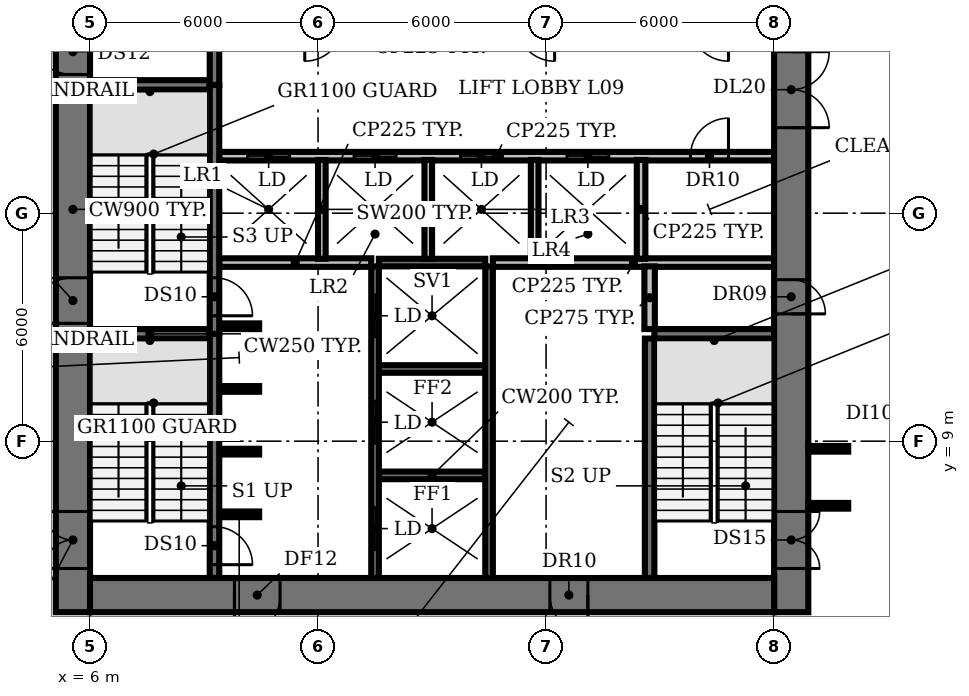
"""IFC4 building model, lengths in metres.
Left out: names, types, materials, properties, quantities, classifications, styles, units other than length and angle.
Written with IfcOpenShell. Run it as: python <this file> out.ifc"""

import sys

from ifc_helpers import new_model, si_unit, direction, frame, frame_2d, origin, place, context, subcontext, project, spatial, rectangle, extrude, element, fill, save


model = new_model("IFC4")
c1 = context("Model", 3, precision=1e-05, world=origin(), true_north=direction((0.0, 1.0)))
c2 = subcontext(c1, "Body", "Model", "MODEL_VIEW")
j1 = project(units=[si_unit("LENGTHUNIT", "METRE"), si_unit("PLANEANGLEUNIT", "RADIAN")], contexts=[c1])
p1 = place(None, origin())
s1 = spatial("IfcSite", under=j1, at=p1, CompositionType="ELEMENT")
p2 = place(p1, origin())
s2 = spatial("IfcBuilding", under=s1, at=p2, CompositionType="ELEMENT")
p3 = place(p2, frame((0.0, 0.0, 41.6)))
s3 = spatial("IfcBuildingStorey", under=s2, at=p3, CompositionType="ELEMENT", Elevation=41.6)
p4 = place(p3, frame((9.4, 7.075, 0.0), z_axis=(0.0, 0.0, 1.0), x_axis=(1.0, 0.0, 0.0)))
e1 = element("IfcWall", 1, at=p4, inside=s3, PredefinedType="SHEAR", context=c2, shape_type="SweptSolid", body=[
    extrude(rectangle(XDim=1.05, YDim=0.15, at=frame_2d((0.525, 0.0))), origin(), (0.0, 0.0, 1.0), 3.85),
])
p5 = place(p3, frame((13.6, 8.1, 0.0), z_axis=(0.0, 0.0, 1.0), x_axis=(1.0, 0.0, 0.0)))
e2 = element("IfcWall", 2, at=p5, inside=s3, PredefinedType="SHEAR", context=c2, shape_type="SweptSolid", body=[
    extrude(rectangle(XDim=2.8, YDim=0.2, at=frame_2d((1.4, 0.0))), origin(), (0.0, 0.0, 1.0), 3.85),
])
for number, where, z_axis, x_axis in (
    (3, (9.4, 8.725, 0.0), (0.0, 0.0, 1.0), (1.0, 0.0, 0.0)),
    (4, (9.4, 10.375, 0.0), (0.0, 0.0, 1.0), (1.0, 0.0, 0.0)),
):
    element("IfcWall", number, at=place(p3, frame(where, z_axis=z_axis, x_axis=x_axis)), inside=s3, PredefinedType="SHEAR", context=c2, shape_type="SweptSolid", body=[
        extrude(rectangle(XDim=1.05, YDim=0.15, at=frame_2d((0.525, 0.0))), origin(), (0.0, 0.0, 1.0), 3.85),
    ])
p6 = place(p3, frame((13.6, 10.9, 0.0), z_axis=(0.0, 0.0, 1.0), x_axis=(1.0, 0.0, 0.0)))
e5 = element("IfcWall", 5, at=p6, inside=s3, PredefinedType="SHEAR", context=c2, shape_type="SweptSolid", body=[
    extrude(rectangle(XDim=2.8, YDim=0.2, at=frame_2d((1.4, 0.0))), origin(), (0.0, 0.0, 1.0), 3.85),
])
for number, where, z_axis, x_axis in (
    (6, (6.0, 11.825, 0.0), (0.0, 0.0, 1.0), (1.0, 0.0, 0.0)),
    (7, (20.85, 11.825, 0.0), (0.0, 0.0, 1.0), (1.0, 0.0, 0.0)),
):
    element("IfcWall", number, at=place(p3, frame(where, z_axis=z_axis, x_axis=x_axis)), inside=s3, PredefinedType="SHEAR", context=c2, shape_type="SweptSolid", body=[
        extrude(rectangle(XDim=3.15, YDim=0.25, at=frame_2d((1.575, 0.0))), origin(), (0.0, 0.0, 1.0), 3.85),
    ])
p7 = place(p3, frame((9.4, 12.025, 0.0), z_axis=(0.0, 0.0, 1.0), x_axis=(1.0, 0.0, 0.0)))
e8 = element("IfcWall", 8, at=p7, inside=s3, PredefinedType="SHEAR", context=c2, shape_type="SweptSolid", body=[
    extrude(rectangle(XDim=1.05, YDim=0.15, at=frame_2d((0.525, 0.0))), origin(), (0.0, 0.0, 1.0), 3.85),
])
p8 = place(p3, frame((9.4, 13.7, 0.0), z_axis=(0.0, 0.0, 1.0), x_axis=(1.0, 0.0, 0.0)))
e9 = element("IfcWall", 9, at=p8, inside=s3, PredefinedType="PARTITIONING", context=c2, shape_type="SweptSolid", body=[
    extrude(rectangle(XDim=4.0, YDim=0.225, at=frame_2d((2.0, 0.0))), origin(), (0.0, 0.0, 1.0), 3.85),
])
p9 = place(p3, frame((13.6, 13.7, 0.0), z_axis=(0.0, 0.0, 1.0), x_axis=(1.0, 0.0, 0.0)))
e10 = element("IfcWall", 10, at=p9, inside=s3, PredefinedType="SHEAR", context=c2, shape_type="SweptSolid", body=[
    extrude(rectangle(XDim=2.8, YDim=0.2, at=frame_2d((1.4, 0.0))), origin(), (0.0, 0.0, 1.0), 3.85),
])
p10 = place(p3, frame((16.6, 13.7, 0.0), z_axis=(0.0, 0.0, 1.0), x_axis=(1.0, 0.0, 0.0)))
e11 = element("IfcWall", 11, at=p10, inside=s3, PredefinedType="PARTITIONING", context=c2, shape_type="SweptSolid", body=[
    extrude(rectangle(XDim=7.4, YDim=0.225, at=frame_2d((3.7, 0.0))), origin(), (0.0, 0.0, 1.0), 3.85),
])
p11 = place(p3, frame((9.4, 16.5, 0.0), z_axis=(0.0, 0.0, 1.0), x_axis=(1.0, 0.0, 0.0)))
e12 = element("IfcWall", 12, at=p11, inside=s3, PredefinedType="PARTITIONING", context=c2, shape_type="SweptSolid", body=[
    extrude(rectangle(XDim=14.6, YDim=0.225, at=frame_2d((7.3, 0.0))), origin(), (0.0, 0.0, 1.0), 3.85),
])
p12 = place(p11, frame((0.75, 0.0, 0.0)))
e13 = element("IfcOpeningElement", 13, at=p12, cuts=e12, PredefinedType="OPENING", context=c2, shape_type="SweptSolid", body=[
    extrude(rectangle(XDim=1.1, YDim=2.1, at=frame_2d((0.55, 1.05))), frame((0.0, 0.123, 0.0), z_axis=(0.0, -1.0, 0.0), x_axis=(1.0, 0.0, 0.0)), (0.0, 0.0, 1.0), 0.245),
])
p13 = place(p11, frame((3.55, 0.0, 0.0)))
e14 = element("IfcOpeningElement", 14, at=p13, cuts=e12, PredefinedType="OPENING", context=c2, shape_type="SweptSolid", body=[
    extrude(rectangle(XDim=1.1, YDim=2.1, at=frame_2d((0.55, 1.05))), frame((0.0, 0.123, 0.0), z_axis=(0.0, -1.0, 0.0), x_axis=(1.0, 0.0, 0.0)), (0.0, 0.0, 1.0), 0.245),
])
p14 = place(p11, frame((6.35, 0.0, 0.0)))
e15 = element("IfcOpeningElement", 15, at=p14, cuts=e12, PredefinedType="OPENING", context=c2, shape_type="SweptSolid", body=[
    extrude(rectangle(XDim=1.1, YDim=2.1, at=frame_2d((0.55, 1.05))), frame((0.0, 0.123, 0.0), z_axis=(0.0, -1.0, 0.0), x_axis=(1.0, 0.0, 0.0)), (0.0, 0.0, 1.0), 0.245),
])
p15 = place(p11, frame((9.15, 0.0, 0.0)))
e16 = element("IfcOpeningElement", 16, at=p15, cuts=e12, PredefinedType="OPENING", context=c2, shape_type="SweptSolid", body=[
    extrude(rectangle(XDim=1.1, YDim=2.1, at=frame_2d((0.55, 1.05))), frame((0.0, 0.123, 0.0), z_axis=(0.0, -1.0, 0.0), x_axis=(1.0, 0.0, 0.0)), (0.0, 0.0, 1.0), 0.245),
])
p16 = place(p11, frame((12.4, 0.0, 0.0)))
e17 = element("IfcOpeningElement", 17, at=p16, cuts=e12, PredefinedType="OPENING", context=c2, shape_type="SweptSolid", body=[
    extrude(rectangle(XDim=1.0, YDim=2.1, at=frame_2d((0.5, 1.05))), frame((0.0, 0.123, 0.0), z_axis=(0.0, -1.0, 0.0), x_axis=(1.0, 0.0, 0.0)), (0.0, 0.0, 1.0), 0.245),
])
p17 = place(p3, frame((6.0, 18.375, 0.0), z_axis=(0.0, 0.0, 1.0), x_axis=(1.0, 0.0, 0.0)))
e18 = element("IfcWall", 18, at=p17, inside=s3, PredefinedType="SHEAR", context=c2, shape_type="SweptSolid", body=[
    extrude(rectangle(XDim=3.15, YDim=0.25, at=frame_2d((1.575, 0.0))), origin(), (0.0, 0.0, 1.0), 3.85),
])
p18 = place(p3, frame((9.275, 11.825, 0.0), z_axis=(0.0, 0.0, 1.0), x_axis=(0.0, -1.0, 0.0)))
e19 = element("IfcWall", 19, at=p18, inside=s3, PredefinedType="SHEAR", context=c2, shape_type="SweptSolid", body=[
    extrude(rectangle(XDim=6.425, YDim=0.25, at=frame_2d((3.212, 0.0))), origin(), (0.0, 0.0, 1.0), 3.85),
])
p19 = place(p18, frame((5.075, 0.0, 0.0)))
e20 = element("IfcOpeningElement", 20, at=p19, cuts=e19, PredefinedType="OPENING", context=c2, shape_type="SweptSolid", body=[
    extrude(rectangle(XDim=1.0, YDim=2.1, at=frame_2d((0.5, 1.05))), frame((0.0, 0.135, 0.0), z_axis=(0.0, -1.0, 0.0), x_axis=(1.0, 0.0, 0.0)), (0.0, 0.0, 1.0), 0.27),
])
p20 = place(p3, frame((9.275, 18.375, 0.0), z_axis=(0.0, 0.0, 1.0), x_axis=(0.0, -1.0, 0.0)))
e21 = element("IfcWall", 21, at=p20, inside=s3, PredefinedType="SHEAR", context=c2, shape_type="SweptSolid", body=[
    extrude(rectangle(XDim=6.55, YDim=0.25, at=frame_2d((3.275, 0.0))), origin(), (0.0, 0.0, 1.0), 3.85),
])
p21 = place(p20, frame((5.075, 0.0, 0.0)))
e22 = element("IfcOpeningElement", 22, at=p21, cuts=e21, PredefinedType="OPENING", context=c2, shape_type="SweptSolid", body=[
    extrude(rectangle(XDim=1.0, YDim=2.1, at=frame_2d((0.5, 1.05))), frame((0.0, 0.135, 0.0), z_axis=(0.0, -1.0, 0.0), x_axis=(1.0, 0.0, 0.0)), (0.0, 0.0, 1.0), 0.27),
])
p22 = place(p3, frame((9.275, 18.375, 0.0), z_axis=(0.0, 0.0, 1.0), x_axis=(0.0, 1.0, 0.0)))
e23 = element("IfcWall", 23, at=p22, inside=s3, PredefinedType="SHEAR", context=c2, shape_type="SweptSolid", body=[
    extrude(rectangle(XDim=6.425, YDim=0.25, at=frame_2d((3.212, 0.0))), origin(), (0.0, 0.0, 1.0), 3.85),
])
p23 = place(p3, frame((12.1, 13.8, 0.0), z_axis=(0.0, 0.0, 1.0), x_axis=(0.0, 1.0, 0.0)))
e24 = element("IfcWall", 24, at=p23, inside=s3, PredefinedType="SOLIDWALL", context=c2, shape_type="SweptSolid", body=[
    extrude(rectangle(XDim=2.6, YDim=0.2, at=frame_2d((1.3, 0.0))), origin(), (0.0, 0.0, 1.0), 3.85),
])
p24 = place(p3, frame((13.5, 5.4, 0.0), z_axis=(0.0, 0.0, 1.0), x_axis=(0.0, 1.0, 0.0)))
e25 = element("IfcWall", 25, at=p24, inside=s3, PredefinedType="SHEAR", context=c2, shape_type="SweptSolid", body=[
    extrude(rectangle(XDim=8.2, YDim=0.2, at=frame_2d((4.1, 0.0))), origin(), (0.0, 0.0, 1.0), 3.85),
])
p25 = place(p24, frame((0.75, 0.0, 0.0)))
e26 = element("IfcOpeningElement", 26, at=p25, cuts=e25, PredefinedType="OPENING", context=c2, shape_type="SweptSolid", body=[
    extrude(rectangle(XDim=1.1, YDim=2.1, at=frame_2d((0.55, 1.05))), frame((0.0, 0.11, 0.0), z_axis=(0.0, -1.0, 0.0), x_axis=(1.0, 0.0, 0.0)), (0.0, 0.0, 1.0), 0.22),
])
p26 = place(p24, frame((3.55, 0.0, 0.0)))
e27 = element("IfcOpeningElement", 27, at=p26, cuts=e25, PredefinedType="OPENING", context=c2, shape_type="SweptSolid", body=[
    extrude(rectangle(XDim=1.1, YDim=2.1, at=frame_2d((0.55, 1.05))), frame((0.0, 0.11, 0.0), z_axis=(0.0, -1.0, 0.0), x_axis=(1.0, 0.0, 0.0)), (0.0, 0.0, 1.0), 0.22),
])
p27 = place(p24, frame((6.35, 0.0, 0.0)))
e28 = element("IfcOpeningElement", 28, at=p27, cuts=e25, PredefinedType="OPENING", context=c2, shape_type="SweptSolid", body=[
    extrude(rectangle(XDim=1.1, YDim=2.1, at=frame_2d((0.55, 1.05))), frame((0.0, 0.11, 0.0), z_axis=(0.0, -1.0, 0.0), x_axis=(1.0, 0.0, 0.0)), (0.0, 0.0, 1.0), 0.22),
])
p28 = place(p3, frame((14.9, 13.8, 0.0), z_axis=(0.0, 0.0, 1.0), x_axis=(0.0, 1.0, 0.0)))
e29 = element("IfcWall", 29, at=p28, inside=s3, PredefinedType="SOLIDWALL", context=c2, shape_type="SweptSolid", body=[
    extrude(rectangle(XDim=2.6, YDim=0.2, at=frame_2d((1.3, 0.0))), origin(), (0.0, 0.0, 1.0), 3.85),
])
p29 = place(p3, frame((16.5, 5.4, 0.0), z_axis=(0.0, 0.0, 1.0), x_axis=(0.0, 1.0, 0.0)))
e30 = element("IfcWall", 30, at=p29, inside=s3, PredefinedType="SHEAR", context=c2, shape_type="SweptSolid", body=[
    extrude(rectangle(XDim=8.2, YDim=0.2, at=frame_2d((4.1, 0.0))), origin(), (0.0, 0.0, 1.0), 3.85),
])
p30 = place(p3, frame((17.7, 13.8, 0.0), z_axis=(0.0, 0.0, 1.0), x_axis=(0.0, 1.0, 0.0)))
e31 = element("IfcWall", 31, at=p30, inside=s3, PredefinedType="SOLIDWALL", context=c2, shape_type="SweptSolid", body=[
    extrude(rectangle(XDim=2.6, YDim=0.2, at=frame_2d((1.3, 0.0))), origin(), (0.0, 0.0, 1.0), 3.85),
])
p31 = place(p3, frame((20.5, 13.8, 0.0), z_axis=(0.0, 0.0, 1.0), x_axis=(0.0, 1.0, 0.0)))
e32 = element("IfcWall", 32, at=p31, inside=s3, PredefinedType="PARTITIONING", context=c2, shape_type="SweptSolid", body=[
    extrude(rectangle(XDim=2.6, YDim=0.225, at=frame_2d((1.3, 0.0))), origin(), (0.0, 0.0, 1.0), 3.85),
])
p32 = place(p3, frame((20.725, 5.4, 0.0), z_axis=(0.0, 0.0, 1.0), x_axis=(0.0, 1.0, 0.0)))
e33 = element("IfcWall", 33, at=p32, inside=s3, PredefinedType="SHEAR", context=c2, shape_type="SweptSolid", body=[
    extrude(rectangle(XDim=6.3, YDim=0.25, at=frame_2d((3.15, 0.0))), origin(), (0.0, 0.0, 1.0), 3.85),
])
p33 = place(p3, frame((20.725, 11.95, 0.0), z_axis=(0.0, 0.0, 1.0), x_axis=(0.0, 1.0, 0.0)))
e34 = element("IfcWall", 34, at=p33, inside=s3, PredefinedType="PARTITIONING", context=c2, shape_type="SweptSolid", body=[
    extrude(rectangle(XDim=1.65, YDim=0.275, at=frame_2d((0.825, 0.0))), origin(), (0.0, 0.0, 1.0), 3.85),
])
p34 = place(p3, frame((5.55, 4.5, 0.0), z_axis=(0.0, 0.0, 1.0), x_axis=(0.0, 1.0, 0.0)))
e35 = element("IfcWall", 35, at=p34, inside=s3, PredefinedType="SHEAR", context=c2, shape_type="SweptSolid", body=[
    extrude(rectangle(XDim=21.2, YDim=0.9, at=frame_2d((10.6, 0.0))), origin(), (0.0, 0.0, 1.0), 3.85),
])
p35 = place(p34, frame((1.15, 0.0, 0.0)))
e36 = element("IfcOpeningElement", 36, at=p35, cuts=e35, PredefinedType="OPENING", context=c2, shape_type="SweptSolid", body=[
    extrude(rectangle(XDim=1.5, YDim=2.1, at=frame_2d((0.75, 1.05))), frame((0.0, 0.46, 0.0), z_axis=(0.0, -1.0, 0.0), x_axis=(1.0, 0.0, 0.0)), (0.0, 0.0, 1.0), 0.92),
])
p36 = place(p34, frame((7.6, 0.0, 0.0)))
e37 = element("IfcOpeningElement", 37, at=p36, cuts=e35, PredefinedType="OPENING", context=c2, shape_type="SweptSolid", body=[
    extrude(rectangle(XDim=1.2, YDim=2.1, at=frame_2d((0.6, 1.05))), frame((0.0, 0.46, 0.0), z_axis=(0.0, -1.0, 0.0), x_axis=(1.0, 0.0, 0.0)), (0.0, 0.0, 1.0), 0.92),
])
p37 = place(p34, frame((14.15, 0.0, 0.0)))
e38 = element("IfcOpeningElement", 38, at=p37, cuts=e35, PredefinedType="OPENING", context=c2, shape_type="SweptSolid", body=[
    extrude(rectangle(XDim=1.2, YDim=2.1, at=frame_2d((0.6, 1.05))), frame((0.0, 0.46, 0.0), z_axis=(0.0, -1.0, 0.0), x_axis=(1.0, 0.0, 0.0)), (0.0, 0.0, 1.0), 0.92),
])
p38 = place(p3, frame((24.45, 25.7, 0.0), z_axis=(0.0, 0.0, 1.0), x_axis=(0.0, -1.0, 0.0)))
e39 = element("IfcWall", 39, at=p38, inside=s3, PredefinedType="SHEAR", context=c2, shape_type="SweptSolid", body=[
    extrude(rectangle(XDim=21.2, YDim=0.9, at=frame_2d((10.6, 0.0))), origin(), (0.0, 0.0, 1.0), 3.85),
])
p39 = place(p38, frame((18.55, 0.0, 0.0)))
e40 = element("IfcOpeningElement", 40, at=p39, cuts=e39, PredefinedType="OPENING", context=c2, shape_type="SweptSolid", body=[
    extrude(rectangle(XDim=1.5, YDim=2.1, at=frame_2d((0.75, 1.05))), frame((0.0, 0.46, 0.0), z_axis=(0.0, -1.0, 0.0), x_axis=(1.0, 0.0, 0.0)), (0.0, 0.0, 1.0), 0.92),
])
p40 = place(p38, frame((12.45, 0.0, 0.0)))
e41 = element("IfcOpeningElement", 41, at=p40, cuts=e39, PredefinedType="OPENING", context=c2, shape_type="SweptSolid", body=[
    extrude(rectangle(XDim=0.9, YDim=2.1, at=frame_2d((0.45, 1.05))), frame((0.0, 0.46, 0.0), z_axis=(0.0, -1.0, 0.0), x_axis=(1.0, 0.0, 0.0)), (0.0, 0.0, 1.0), 0.92),
])
p41 = place(p38, frame((6.45, 0.0, 0.0)))
e42 = element("IfcOpeningElement", 42, at=p41, cuts=e39, PredefinedType="OPENING", context=c2, shape_type="SweptSolid", body=[
    extrude(rectangle(XDim=2.0, YDim=2.1, at=frame_2d((1.0, 1.05))), frame((0.0, 0.46, 0.0), z_axis=(0.0, -1.0, 0.0), x_axis=(1.0, 0.0, 0.0)), (0.0, 0.0, 1.0), 0.92),
])
p42 = place(p3, frame((24.0, 4.95, 0.0), z_axis=(0.0, 0.0, 1.0), x_axis=(-1.0, 0.0, 0.0)))
e43 = element("IfcWall", 43, at=p42, inside=s3, PredefinedType="SHEAR", context=c2, shape_type="SweptSolid", body=[
    extrude(rectangle(XDim=18.0, YDim=0.9, at=frame_2d((9.0, 0.0))), origin(), (0.0, 0.0, 1.0), 3.85),
])
p43 = place(p42, frame((13.0, 0.0, 0.0)))
e44 = element("IfcOpeningElement", 44, at=p43, cuts=e43, PredefinedType="OPENING", context=c2, shape_type="SweptSolid", body=[
    extrude(rectangle(XDim=1.2, YDim=2.1, at=frame_2d((0.6, 1.05))), frame((0.0, 0.46, 0.0), z_axis=(0.0, -1.0, 0.0), x_axis=(1.0, 0.0, 0.0)), (0.0, 0.0, 1.0), 0.92),
])
p44 = place(p42, frame((4.9, 0.0, 0.0)))
e45 = element("IfcOpeningElement", 45, at=p44, cuts=e43, PredefinedType="OPENING", context=c2, shape_type="SweptSolid", body=[
    extrude(rectangle(XDim=1.0, YDim=2.1, at=frame_2d((0.5, 1.05))), frame((0.0, 0.46, 0.0), z_axis=(0.0, -1.0, 0.0), x_axis=(1.0, 0.0, 0.0)), (0.0, 0.0, 1.0), 0.92),
])
for number, where, z_axis, x_axis in (
    (46, (24.9, 7.3, 0.0), (0.0, 0.0, 1.0), (1.0, 0.0, 0.0)),
    (47, (24.9, 8.8, 0.0), (0.0, 0.0, 1.0), (1.0, 0.0, 0.0)),
):
    element("IfcWall", number, at=place(p3, frame(where, z_axis=z_axis, x_axis=x_axis)), inside=s3, PredefinedType="PARTITIONING", context=c2, shape_type="SweptSolid", body=[
        extrude(rectangle(XDim=1.05, YDim=0.15, at=frame_2d((0.525, 0.0))), origin(), (0.0, 0.0, 1.0), 2.83),
    ])
p45 = place(p12, origin())
e48 = element("IfcDoor", 48, at=p45, inside=s3, OperationType="DOUBLE_DOOR_SLIDING", PredefinedType="DOOR", context=c2, shape_type="SweptSolid", body=[
    extrude(rectangle(XDim=1.1, YDim=2.1, at=frame_2d((0.55, 1.05))), frame((0.0, 0.025, 0.0), z_axis=(0.0, -1.0, 0.0), x_axis=(1.0, 0.0, 0.0)), (0.0, 0.0, 1.0), 0.05),
])
fill(e13, e48)
p46 = place(p13, origin())
e49 = element("IfcDoor", 49, at=p46, inside=s3, OperationType="DOUBLE_DOOR_SLIDING", PredefinedType="DOOR", context=c2, shape_type="SweptSolid", body=[
    extrude(rectangle(XDim=1.1, YDim=2.1, at=frame_2d((0.55, 1.05))), frame((0.0, 0.025, 0.0), z_axis=(0.0, -1.0, 0.0), x_axis=(1.0, 0.0, 0.0)), (0.0, 0.0, 1.0), 0.05),
])
fill(e14, e49)
p47 = place(p14, origin())
e50 = element("IfcDoor", 50, at=p47, inside=s3, OperationType="DOUBLE_DOOR_SLIDING", PredefinedType="DOOR", context=c2, shape_type="SweptSolid", body=[
    extrude(rectangle(XDim=1.1, YDim=2.1, at=frame_2d((0.55, 1.05))), frame((0.0, 0.025, 0.0), z_axis=(0.0, -1.0, 0.0), x_axis=(1.0, 0.0, 0.0)), (0.0, 0.0, 1.0), 0.05),
])
fill(e15, e50)
p48 = place(p15, origin())
e51 = element("IfcDoor", 51, at=p48, inside=s3, OperationType="DOUBLE_DOOR_SLIDING", PredefinedType="DOOR", context=c2, shape_type="SweptSolid", body=[
    extrude(rectangle(XDim=1.1, YDim=2.1, at=frame_2d((0.55, 1.05))), frame((0.0, 0.025, 0.0), z_axis=(0.0, -1.0, 0.0), x_axis=(1.0, 0.0, 0.0)), (0.0, 0.0, 1.0), 0.05),
])
fill(e16, e51)
p49 = place(p16, origin())
e52 = element("IfcDoor", 52, at=p49, inside=s3, OperationType="SINGLE_SWING_RIGHT", PredefinedType="DOOR", context=c2, shape_type="SweptSolid", body=[
    extrude(rectangle(XDim=1.0, YDim=2.1, at=frame_2d((0.5, 1.05))), frame((0.0, 0.025, 0.0), z_axis=(0.0, -1.0, 0.0), x_axis=(1.0, 0.0, 0.0)), (0.0, 0.0, 1.0), 0.05),
])
fill(e17, e52)
p50 = place(p19, origin())
e53 = element("IfcDoor", 53, at=p50, inside=s3, OperationType="SINGLE_SWING_RIGHT", PredefinedType="DOOR", context=c2, shape_type="SweptSolid", body=[
    extrude(rectangle(XDim=1.0, YDim=2.1, at=frame_2d((0.5, 1.05))), frame((0.0, 0.025, 0.0), z_axis=(0.0, -1.0, 0.0), x_axis=(1.0, 0.0, 0.0)), (0.0, 0.0, 1.0), 0.05),
])
fill(e20, e53)
p51 = place(p21, origin())
e54 = element("IfcDoor", 54, at=p51, inside=s3, OperationType="SINGLE_SWING_RIGHT", PredefinedType="DOOR", context=c2, shape_type="SweptSolid", body=[
    extrude(rectangle(XDim=1.0, YDim=2.1, at=frame_2d((0.5, 1.05))), frame((0.0, 0.025, 0.0), z_axis=(0.0, -1.0, 0.0), x_axis=(1.0, 0.0, 0.0)), (0.0, 0.0, 1.0), 0.05),
])
fill(e22, e54)
p52 = place(p25, origin())
e55 = element("IfcDoor", 55, at=p52, inside=s3, OperationType="DOUBLE_DOOR_SLIDING", PredefinedType="DOOR", context=c2, shape_type="SweptSolid", body=[
    extrude(rectangle(XDim=1.1, YDim=2.1, at=frame_2d((0.55, 1.05))), frame((0.0, 0.025, 0.0), z_axis=(0.0, -1.0, 0.0), x_axis=(1.0, 0.0, 0.0)), (0.0, 0.0, 1.0), 0.05),
])
fill(e26, e55)
p53 = place(p26, origin())
e56 = element("IfcDoor", 56, at=p53, inside=s3, OperationType="DOUBLE_DOOR_SLIDING", PredefinedType="DOOR", context=c2, shape_type="SweptSolid", body=[
    extrude(rectangle(XDim=1.1, YDim=2.1, at=frame_2d((0.55, 1.05))), frame((0.0, 0.025, 0.0), z_axis=(0.0, -1.0, 0.0), x_axis=(1.0, 0.0, 0.0)), (0.0, 0.0, 1.0), 0.05),
])
fill(e27, e56)
p54 = place(p27, origin())
e57 = element("IfcDoor", 57, at=p54, inside=s3, OperationType="DOUBLE_DOOR_SLIDING", PredefinedType="DOOR", context=c2, shape_type="SweptSolid", body=[
    extrude(rectangle(XDim=1.1, YDim=2.1, at=frame_2d((0.55, 1.05))), frame((0.0, 0.025, 0.0), z_axis=(0.0, -1.0, 0.0), x_axis=(1.0, 0.0, 0.0)), (0.0, 0.0, 1.0), 0.05),
])
fill(e28, e57)
p55 = place(p35, origin())
e58 = element("IfcDoor", 58, at=p55, inside=s3, OperationType="DOUBLE_DOOR_SINGLE_SWING", PredefinedType="DOOR", context=c2, shape_type="SweptSolid", body=[
    extrude(rectangle(XDim=1.5, YDim=2.1, at=frame_2d((0.75, 1.05))), frame((0.0, 0.025, 0.0), z_axis=(0.0, -1.0, 0.0), x_axis=(1.0, 0.0, 0.0)), (0.0, 0.0, 1.0), 0.05),
])
fill(e36, e58)
p56 = place(p36, origin())
e59 = element("IfcDoor", 59, at=p56, inside=s3, OperationType="SINGLE_SWING_LEFT", PredefinedType="DOOR", context=c2, shape_type="SweptSolid", body=[
    extrude(rectangle(XDim=1.2, YDim=2.1, at=frame_2d((0.6, 1.05))), frame((0.0, 0.025, 0.0), z_axis=(0.0, -1.0, 0.0), x_axis=(1.0, 0.0, 0.0)), (0.0, 0.0, 1.0), 0.05),
])
fill(e37, e59)
p57 = place(p37, origin())
e60 = element("IfcDoor", 60, at=p57, inside=s3, OperationType="SINGLE_SWING_RIGHT", PredefinedType="DOOR", context=c2, shape_type="SweptSolid", body=[
    extrude(rectangle(XDim=1.2, YDim=2.1, at=frame_2d((0.6, 1.05))), frame((0.0, 0.025, 0.0), z_axis=(0.0, -1.0, 0.0), x_axis=(1.0, 0.0, 0.0)), (0.0, 0.0, 1.0), 0.05),
])
fill(e38, e60)
p58 = place(p39, origin())
e61 = element("IfcDoor", 61, at=p58, inside=s3, OperationType="DOUBLE_DOOR_SINGLE_SWING", PredefinedType="DOOR", context=c2, shape_type="SweptSolid", body=[
    extrude(rectangle(XDim=1.5, YDim=2.1, at=frame_2d((0.75, 1.05))), frame((0.0, 0.025, 0.0), z_axis=(0.0, -1.0, 0.0), x_axis=(1.0, 0.0, 0.0)), (0.0, 0.0, 1.0), 0.05),
])
fill(e40, e61)
p59 = place(p40, origin())
e62 = element("IfcDoor", 62, at=p59, inside=s3, OperationType="SINGLE_SWING_RIGHT", PredefinedType="DOOR", context=c2, shape_type="SweptSolid", body=[
    extrude(rectangle(XDim=0.9, YDim=2.1, at=frame_2d((0.45, 1.05))), frame((0.0, -0.39, 0.0), z_axis=(0.0, -1.0, 0.0), x_axis=(1.0, 0.0, 0.0)), (0.0, 0.0, 1.0), 0.05),
])
fill(e41, e62)
p60 = place(p41, origin())
e63 = element("IfcDoor", 63, at=p60, inside=s3, OperationType="DOUBLE_DOOR_SINGLE_SWING", PredefinedType="DOOR", context=c2, shape_type="SweptSolid", body=[
    extrude(rectangle(XDim=2.0, YDim=2.1, at=frame_2d((1.0, 1.05))), frame((0.0, 0.025, 0.0), z_axis=(0.0, -1.0, 0.0), x_axis=(1.0, 0.0, 0.0)), (0.0, 0.0, 1.0), 0.05),
])
fill(e42, e63)
p61 = place(p43, origin())
e64 = element("IfcDoor", 64, at=p61, inside=s3, OperationType="SINGLE_SWING_RIGHT", PredefinedType="DOOR", context=c2, shape_type="SweptSolid", body=[
    extrude(rectangle(XDim=1.2, YDim=2.1, at=frame_2d((0.6, 1.05))), frame((0.0, 0.025, 0.0), z_axis=(0.0, -1.0, 0.0), x_axis=(1.0, 0.0, 0.0)), (0.0, 0.0, 1.0), 0.05),
])
fill(e44, e64)
p62 = place(p44, origin())
e65 = element("IfcDoor", 65, at=p62, inside=s3, OperationType="SINGLE_SWING_LEFT", PredefinedType="DOOR", context=c2, shape_type="SweptSolid", body=[
    extrude(rectangle(XDim=1.0, YDim=2.1, at=frame_2d((0.5, 1.05))), frame((0.0, -0.39, 0.0), z_axis=(0.0, -1.0, 0.0), x_axis=(1.0, 0.0, 0.0)), (0.0, 0.0, 1.0), 0.05),
])
fill(e45, e65)
save(model, sys.argv[1])
